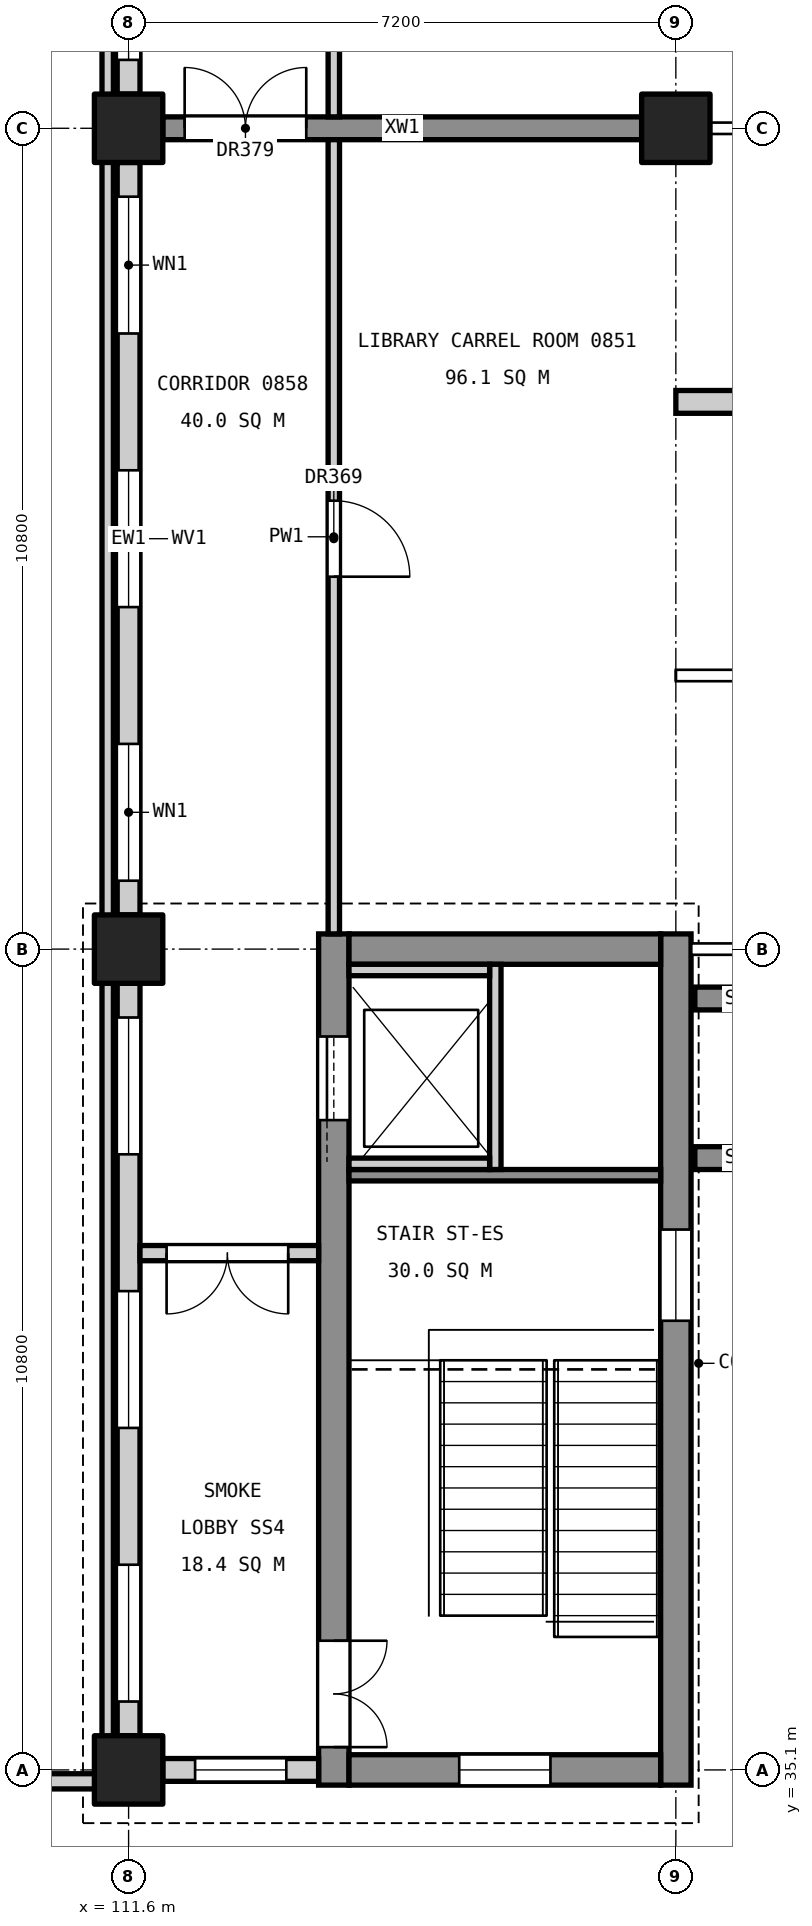
"""IFC4 building model, lengths in metres.
Left out: names, types, materials, properties, quantities, classifications, styles, units other than length and angle.
Written with IfcOpenShell. Run it as: python <this file> out.ifc"""

import sys

from ifc_helpers import new_model, si_unit, direction, frame, frame_2d, origin, origin_2d, place, context, subcontext, project, spatial, rectangle, extrude, element, fill, save


model = new_model("IFC4")
c1 = context("Model", 3, precision=1e-05, world=origin(), true_north=direction((0.0, 1.0)))
c2 = subcontext(c1, "Body", "Model", "MODEL_VIEW")
j1 = project(units=[si_unit("LENGTHUNIT", "METRE"), si_unit("PLANEANGLEUNIT", "RADIAN")], contexts=[c1])
p1 = place(None, origin())
s1 = spatial("IfcSite", under=j1, at=p1, CompositionType="ELEMENT")
p2 = place(p1, origin())
s2 = spatial("IfcBuilding", under=s1, at=p2, CompositionType="ELEMENT")
p3 = place(p2, frame((0.0, 0.0, 41.4)))
s3 = spatial("IfcBuildingStorey", under=s2, at=p3, CompositionType="ELEMENT", Elevation=41.4)
for number, where, z_axis, x_axis in (
    (1, (118.8, 56.7, 0.0), (0.0, 0.0, 1.0), (1.0, 0.0, 0.0)),
    (2, (111.6, 35.1, 0.0), (0.0, 0.0, 1.0), (1.0, 0.0, 0.0)),
    (3, (111.6, 45.9, 0.0), (0.0, 0.0, 1.0), (1.0, 0.0, 0.0)),
    (4, (111.6, 56.7, 0.0), (0.0, 0.0, 1.0), (1.0, 0.0, 0.0)),
):
    element("IfcColumn", number, at=place(p3, frame(where, z_axis=z_axis, x_axis=x_axis)), inside=s3, PredefinedType="COLUMN", context=c2, shape_type="SweptSolid", body=[
        extrude(rectangle(XDim=0.9, YDim=0.9, at=origin_2d()), origin(), (0.0, 0.0, 1.0), 4.8),
    ])
p4 = place(p3, frame((118.8, 34.9, 0.0), z_axis=(0.0, 0.0, 1.0), x_axis=(0.0, 1.0, 0.0)))
e5 = element("IfcWall", 5, at=p4, inside=s3, PredefinedType="SHEAR", context=c2, shape_type="SweptSolid", body=[
    extrude(rectangle(XDim=11.2, YDim=0.4, at=frame_2d((5.6, 0.0))), origin(), (0.0, 0.0, 1.0), 4.55),
])
p5 = place(p4, frame((6.11, 0.0, 3.4)))
e6 = element("IfcOpeningElement", 6, at=p5, cuts=e5, PredefinedType="OPENING", context=c2, shape_type="SweptSolid", body=[
    extrude(rectangle(XDim=1.2, YDim=0.9, at=frame_2d((0.6, 0.45))), frame((0.0, 0.21, 0.0), z_axis=(0.0, -1.0, 0.0), x_axis=(1.0, 0.0, 0.0)), (0.0, 0.0, 1.0), 0.42),
])
p6 = place(p3, frame((114.3, 34.9, 0.0), z_axis=(0.0, 0.0, 1.0), x_axis=(0.0, 1.0, 0.0)))
e7 = element("IfcWall", 7, at=p6, inside=s3, PredefinedType="SHEAR", context=c2, shape_type="SweptSolid", body=[
    extrude(rectangle(XDim=11.2, YDim=0.4, at=frame_2d((5.6, 0.0))), origin(), (0.0, 0.0, 1.0), 4.55),
])
p7 = place(p6, frame((0.5, 0.0, 0.0)))
e8 = element("IfcOpeningElement", 8, at=p7, cuts=e7, PredefinedType="OPENING", context=c2, shape_type="SweptSolid", body=[
    extrude(rectangle(XDim=1.4, YDim=2.1, at=frame_2d((0.7, 1.05))), frame((0.0, 0.21, 0.0), z_axis=(0.0, -1.0, 0.0), x_axis=(1.0, 0.0, 0.0)), (0.0, 0.0, 1.0), 0.42),
])
p8 = place(p6, frame((8.75, 0.0, 0.0)))
e9 = element("IfcOpeningElement", 9, at=p8, cuts=e7, PredefinedType="OPENING", context=c2, shape_type="SweptSolid", body=[
    extrude(rectangle(XDim=1.1, YDim=2.1, at=frame_2d((0.55, 1.05))), frame((0.0, 0.21, 0.0), z_axis=(0.0, -1.0, 0.0), x_axis=(1.0, 0.0, 0.0)), (0.0, 0.0, 1.0), 0.42),
])
p9 = place(p3, frame((118.6, 35.1, 0.0), z_axis=(0.0, 0.0, 1.0), x_axis=(-1.0, 0.0, 0.0)))
e10 = element("IfcWall", 10, at=p9, inside=s3, PredefinedType="SHEAR", context=c2, shape_type="SweptSolid", body=[
    extrude(rectangle(XDim=4.1, YDim=0.4, at=frame_2d((2.05, 0.0))), origin(), (0.0, 0.0, 1.0), 4.55),
])
p10 = place(p9, frame((1.45, 0.0, 3.4)))
e11 = element("IfcOpeningElement", 11, at=p10, cuts=e10, PredefinedType="OPENING", context=c2, shape_type="SweptSolid", body=[
    extrude(rectangle(XDim=1.2, YDim=0.9, at=frame_2d((0.6, 0.45))), frame((0.0, 0.21, 0.0), z_axis=(0.0, -1.0, 0.0), x_axis=(1.0, 0.0, 0.0)), (0.0, 0.0, 1.0), 0.42),
])
p11 = place(p3, frame((118.6, 45.9, 0.0), z_axis=(0.0, 0.0, 1.0), x_axis=(-1.0, 0.0, 0.0)))
e12 = element("IfcWall", 12, at=p11, inside=s3, PredefinedType="SHEAR", context=c2, shape_type="SweptSolid", body=[
    extrude(rectangle(XDim=4.1, YDim=0.4, at=frame_2d((2.05, 0.0))), origin(), (0.0, 0.0, 1.0), 4.55),
])
for number, where, z_axis, x_axis in (
    (13, (119.05, 43.15, 0.0), (0.0, 0.0, 1.0), (1.0, 0.0, 0.0)),
    (14, (119.05, 45.25, 0.0), (0.0, 0.0, 1.0), (1.0, 0.0, 0.0)),
):
    element("IfcWall", number, at=place(p3, frame(where, z_axis=z_axis, x_axis=x_axis)), inside=s3, PredefinedType="SHEAR", context=c2, shape_type="SweptSolid", body=[
        extrude(rectangle(XDim=1.25, YDim=0.3, at=frame_2d((0.625, 0.0))), origin(), (0.0, 0.0, 1.0), 4.8),
    ])
p12 = place(p3, frame((118.35, 56.7, 0.0), z_axis=(0.0, 0.0, 1.0), x_axis=(-1.0, 0.0, 0.0)))
e15 = element("IfcWall", 15, at=p12, inside=s3, PredefinedType="SHEAR", context=c2, shape_type="SweptSolid", body=[
    extrude(rectangle(XDim=6.3, YDim=0.3, at=frame_2d((3.15, 0.0))), origin(), (0.0, 0.0, 1.0), 4.55),
])
p13 = place(p12, frame((4.413, 0.0, 0.0)))
e16 = element("IfcOpeningElement", 16, at=p13, cuts=e15, PredefinedType="OPENING", context=c2, shape_type="SweptSolid", body=[
    extrude(rectangle(XDim=1.6, YDim=2.1, at=frame_2d((0.8, 1.05))), frame((0.0, 0.16, 0.0), z_axis=(0.0, -1.0, 0.0), x_axis=(1.0, 0.0, 0.0)), (0.0, 0.0, 1.0), 0.32),
])
p14 = place(p3, frame((118.6, 42.925, 0.0), z_axis=(0.0, 0.0, 1.0), x_axis=(-1.0, 0.0, 0.0)))
e17 = element("IfcWall", 17, at=p14, inside=s3, PredefinedType="SOLIDWALL", context=c2, shape_type="SweptSolid", body=[
    extrude(rectangle(XDim=4.1, YDim=0.15, at=frame_2d((2.05, 0.0))), origin(), (0.0, 0.0, 1.0), 4.55),
])
p15 = place(p3, frame((116.425, 43.0, 0.0), z_axis=(0.0, 0.0, 1.0), x_axis=(0.0, 1.0, 0.0)))
e18 = element("IfcWall", 18, at=p15, inside=s3, PredefinedType="SOLIDWALL", context=c2, shape_type="SweptSolid", body=[
    extrude(rectangle(XDim=2.7, YDim=0.15, at=frame_2d((1.35, 0.0))), origin(), (0.0, 0.0, 1.0), 4.55),
])
for number, where, z_axis, x_axis in (
    (19, (116.35, 43.075, 0.0), (0.0, 0.0, 1.0), (-1.0, 0.0, 0.0)),
    (20, (116.35, 45.625, 0.0), (0.0, 0.0, 1.0), (-1.0, 0.0, 0.0)),
):
    element("IfcWall", number, at=place(p3, frame(where, z_axis=z_axis, x_axis=x_axis)), inside=s3, PredefinedType="SOLIDWALL", context=c2, shape_type="SweptSolid", body=[
        extrude(rectangle(XDim=1.85, YDim=0.15, at=frame_2d((0.925, 0.0))), origin(), (0.0, 0.0, 1.0), 4.55),
    ])
p16 = place(p3, frame((111.25, 34.95, 0.0), z_axis=(0.0, 0.0, 1.0), x_axis=(-1.0, 0.0, 0.0)))
e21 = element("IfcWall", 21, at=p16, inside=s3, PredefinedType="PARAPET", context=c2, shape_type="SweptSolid", body=[
    extrude(rectangle(XDim=10.8, YDim=0.2, at=frame_2d((5.4, 0.0))), origin(), (0.0, 0.0, 1.0), 1.1),
])
p17 = place(p3, frame((111.325, 35.05, 0.0), z_axis=(0.0, 0.0, 1.0), x_axis=(0.0, 1.0, 0.0)))
e22 = element("IfcWall", 22, at=p17, inside=s3, PredefinedType="PARAPET", context=c2, shape_type="SweptSolid", body=[
    extrude(rectangle(XDim=64.9, YDim=0.15, at=frame_2d((32.45, 0.0))), origin(), (0.0, 0.0, 1.0), 0.3),
])
p18 = place(p3, frame((114.1, 35.1, 0.0), z_axis=(0.0, 0.0, 1.0), x_axis=(-1.0, 0.0, 0.0)))
e23 = element("IfcWall", 23, at=p18, inside=s3, PredefinedType="STANDARD", context=c2, shape_type="SweptSolid", body=[
    extrude(rectangle(XDim=2.05, YDim=0.3, at=frame_2d((1.025, 0.0))), origin(), (0.0, 0.0, 1.0), 3.85),
])
p19 = place(p18, frame((0.425, 0.0, 0.9)))
e24 = element("IfcOpeningElement", 24, at=p19, cuts=e23, PredefinedType="OPENING", context=c2, shape_type="SweptSolid", body=[
    extrude(rectangle(XDim=1.2, YDim=2.4, at=frame_2d((0.6, 1.2))), frame((0.0, 0.16, 0.0), z_axis=(0.0, -1.0, 0.0), x_axis=(1.0, 0.0, 0.0)), (0.0, 0.0, 1.0), 0.32),
])
p20 = place(p3, frame((111.6, 35.55, 0.0), z_axis=(0.0, 0.0, 1.0), x_axis=(0.0, 1.0, 0.0)))
e25 = element("IfcWall", 25, at=p20, inside=s3, PredefinedType="STANDARD", context=c2, shape_type="SweptSolid", body=[
    extrude(rectangle(XDim=9.9, YDim=0.3, at=frame_2d((4.95, 0.0))), origin(), (0.0, 0.0, 1.0), 3.55),
])
p21 = place(p20, frame((0.45, 0.0, 0.9)))
e26 = element("IfcOpeningElement", 26, at=p21, cuts=e25, PredefinedType="OPENING", context=c2, shape_type="SweptSolid", body=[
    extrude(rectangle(XDim=1.8, YDim=2.4, at=frame_2d((0.9, 1.2))), frame((0.0, 0.16, 0.0), z_axis=(0.0, -1.0, 0.0), x_axis=(1.0, 0.0, 0.0)), (0.0, 0.0, 1.0), 0.32),
])
p22 = place(p20, frame((4.05, 0.0, 0.9)))
e27 = element("IfcOpeningElement", 27, at=p22, cuts=e25, PredefinedType="OPENING", context=c2, shape_type="SweptSolid", body=[
    extrude(rectangle(XDim=1.8, YDim=2.4, at=frame_2d((0.9, 1.2))), frame((0.0, 0.16, 0.0), z_axis=(0.0, -1.0, 0.0), x_axis=(1.0, 0.0, 0.0)), (0.0, 0.0, 1.0), 0.32),
])
p23 = place(p20, frame((7.65, 0.0, 0.9)))
e28 = element("IfcOpeningElement", 28, at=p23, cuts=e25, PredefinedType="OPENING", context=c2, shape_type="SweptSolid", body=[
    extrude(rectangle(XDim=1.8, YDim=2.4, at=frame_2d((0.9, 1.2))), frame((0.0, 0.16, 0.0), z_axis=(0.0, -1.0, 0.0), x_axis=(1.0, 0.0, 0.0)), (0.0, 0.0, 1.0), 0.32),
])
p24 = place(p3, frame((111.6, 46.35, 0.0), z_axis=(0.0, 0.0, 1.0), x_axis=(0.0, 1.0, 0.0)))
e29 = element("IfcWall", 29, at=p24, inside=s3, PredefinedType="STANDARD", context=c2, shape_type="SweptSolid", body=[
    extrude(rectangle(XDim=9.9, YDim=0.3, at=frame_2d((4.95, 0.0))), origin(), (0.0, 0.0, 1.0), 3.55),
])
p25 = place(p24, frame((0.45, 0.0, 0.9)))
e30 = element("IfcOpeningElement", 30, at=p25, cuts=e29, PredefinedType="OPENING", context=c2, shape_type="SweptSolid", body=[
    extrude(rectangle(XDim=1.8, YDim=2.4, at=frame_2d((0.9, 1.2))), frame((0.0, 0.16, 0.0), z_axis=(0.0, -1.0, 0.0), x_axis=(1.0, 0.0, 0.0)), (0.0, 0.0, 1.0), 0.32),
])
p26 = place(p24, frame((4.05, 0.0, 0.9)))
e31 = element("IfcOpeningElement", 31, at=p26, cuts=e29, PredefinedType="OPENING", context=c2, shape_type="SweptSolid", body=[
    extrude(rectangle(XDim=1.8, YDim=2.4, at=frame_2d((0.9, 1.2))), frame((0.0, 0.16, 0.0), z_axis=(0.0, -1.0, 0.0), x_axis=(1.0, 0.0, 0.0)), (0.0, 0.0, 1.0), 0.32),
])
p27 = place(p24, frame((7.65, 0.0, 0.9)))
e32 = element("IfcOpeningElement", 32, at=p27, cuts=e29, PredefinedType="OPENING", context=c2, shape_type="SweptSolid", body=[
    extrude(rectangle(XDim=1.8, YDim=2.4, at=frame_2d((0.9, 1.2))), frame((0.0, 0.16, 0.0), z_axis=(0.0, -1.0, 0.0), x_axis=(1.0, 0.0, 0.0)), (0.0, 0.0, 1.0), 0.32),
])
p28 = place(p3, frame((111.6, 57.15, 0.0), z_axis=(0.0, 0.0, 1.0), x_axis=(0.0, 1.0, 0.0)))
e33 = element("IfcWall", 33, at=p28, inside=s3, PredefinedType="STANDARD", context=c2, shape_type="SweptSolid", body=[
    extrude(rectangle(XDim=9.9, YDim=0.3, at=frame_2d((4.95, 0.0))), origin(), (0.0, 0.0, 1.0), 3.55),
])
p29 = place(p28, frame((0.45, 0.0, 0.9)))
e34 = element("IfcOpeningElement", 34, at=p29, cuts=e33, PredefinedType="OPENING", context=c2, shape_type="SweptSolid", body=[
    extrude(rectangle(XDim=1.8, YDim=2.4, at=frame_2d((0.9, 1.2))), frame((0.0, 0.16, 0.0), z_axis=(0.0, -1.0, 0.0), x_axis=(1.0, 0.0, 0.0)), (0.0, 0.0, 1.0), 0.32),
])
p30 = place(p28, frame((4.05, 0.0, 0.9)))
e35 = element("IfcOpeningElement", 35, at=p30, cuts=e33, PredefinedType="OPENING", context=c2, shape_type="SweptSolid", body=[
    extrude(rectangle(XDim=1.8, YDim=2.4, at=frame_2d((0.9, 1.2))), frame((0.0, 0.16, 0.0), z_axis=(0.0, -1.0, 0.0), x_axis=(1.0, 0.0, 0.0)), (0.0, 0.0, 1.0), 0.32),
])
p31 = place(p28, frame((7.65, 0.0, 0.9)))
e36 = element("IfcOpeningElement", 36, at=p31, cuts=e33, PredefinedType="OPENING", context=c2, shape_type="SweptSolid", body=[
    extrude(rectangle(XDim=1.8, YDim=2.4, at=frame_2d((0.9, 1.2))), frame((0.0, 0.16, 0.0), z_axis=(0.0, -1.0, 0.0), x_axis=(1.0, 0.0, 0.0)), (0.0, 0.0, 1.0), 0.32),
])
p32 = place(p3, frame((123.6, 53.1, 0.0), z_axis=(0.0, 0.0, 1.0), x_axis=(-1.0, 0.0, 0.0)))
e37 = element("IfcWall", 37, at=p32, inside=s3, PredefinedType="STANDARD", context=c2, shape_type="SweptSolid", body=[
    extrude(rectangle(XDim=4.8, YDim=0.3, at=frame_2d((2.4, 0.0))), origin(), (0.0, 0.0, 1.0), 3.65),
])
p33 = place(p3, frame((114.3, 46.1, 0.0), z_axis=(0.0, 0.0, 1.0), x_axis=(0.0, 1.0, 0.0)))
e38 = element("IfcWall", 38, at=p33, inside=s3, PredefinedType="PARTITIONING", context=c2, shape_type="SweptSolid", body=[
    extrude(rectangle(XDim=10.45, YDim=0.15, at=frame_2d((5.225, 0.0))), origin(), (0.0, 0.0, 1.0), 3.55),
])
p34 = place(p33, frame((4.7, 0.0, 0.0)))
e39 = element("IfcOpeningElement", 39, at=p34, cuts=e38, PredefinedType="OPENING", context=c2, shape_type="SweptSolid", body=[
    extrude(rectangle(XDim=1.0, YDim=2.1, at=frame_2d((0.5, 1.05))), frame((0.0, 0.085, 0.0), z_axis=(0.0, -1.0, 0.0), x_axis=(1.0, 0.0, 0.0)), (0.0, 0.0, 1.0), 0.17),
])
p35 = place(p3, frame((114.3, 56.85, 0.0), z_axis=(0.0, 0.0, 1.0), x_axis=(0.0, 1.0, 0.0)))
e40 = element("IfcWall", 40, at=p35, inside=s3, PredefinedType="PARTITIONING", context=c2, shape_type="SweptSolid", body=[
    extrude(rectangle(XDim=3.25, YDim=0.15, at=frame_2d((1.625, 0.0))), origin(), (0.0, 0.0, 1.0), 3.55),
])
p36 = place(p35, frame((1.15, 0.0, 0.0)))
e41 = element("IfcOpeningElement", 41, at=p36, cuts=e40, PredefinedType="OPENING", context=c2, shape_type="SweptSolid", body=[
    extrude(rectangle(XDim=1.0, YDim=2.1, at=frame_2d((0.5, 1.05))), frame((0.0, 0.085, 0.0), z_axis=(0.0, -1.0, 0.0), x_axis=(1.0, 0.0, 0.0)), (0.0, 0.0, 1.0), 0.17),
])
p37 = place(p3, frame((114.1, 41.9, 0.0), z_axis=(0.0, 0.0, 1.0), x_axis=(-1.0, 0.0, 0.0)))
e42 = element("IfcWall", 42, at=p37, inside=s3, PredefinedType="PARTITIONING", context=c2, shape_type="SweptSolid", body=[
    extrude(rectangle(XDim=2.35, YDim=0.2, at=frame_2d((1.175, 0.0))), origin(), (0.0, 0.0, 1.0), 3.55),
])
p38 = place(p37, frame((0.4, 0.0, 0.0)))
e43 = element("IfcOpeningElement", 43, at=p38, cuts=e42, PredefinedType="OPENING", context=c2, shape_type="SweptSolid", body=[
    extrude(rectangle(XDim=1.6, YDim=2.1, at=frame_2d((0.8, 1.05))), frame((0.0, 0.11, 0.0), z_axis=(0.0, -1.0, 0.0), x_axis=(1.0, 0.0, 0.0)), (0.0, 0.0, 1.0), 0.22),
])
p39 = place(p7, frame((1.4, 0.0, 0.0), z_axis=(0.0, 0.0, 1.0), x_axis=(-1.0, 0.0, 0.0)))
e44 = element("IfcDoor", 44, at=p39, inside=s3, OperationType="DOUBLE_DOOR_SINGLE_SWING", PredefinedType="DOOR", context=c2, shape_type="SweptSolid", body=[
    extrude(rectangle(XDim=1.4, YDim=2.1, at=frame_2d((0.7, 1.05))), frame((0.0, 0.025, 0.0), z_axis=(0.0, -1.0, 0.0), x_axis=(1.0, 0.0, 0.0)), (0.0, 0.0, 1.0), 0.05),
])
fill(e8, e44)
p40 = place(p8, origin())
e45 = element("IfcDoor", 45, at=p40, inside=s3, OperationType="SLIDING_TO_LEFT", PredefinedType="DOOR", context=c2, shape_type="SweptSolid", body=[
    extrude(rectangle(XDim=1.1, YDim=2.1, at=frame_2d((0.55, 1.05))), frame((0.0, 0.025, 0.0), z_axis=(0.0, -1.0, 0.0), x_axis=(1.0, 0.0, 0.0)), (0.0, 0.0, 1.0), 0.05),
])
fill(e9, e45)
p41 = place(p19, origin())
e46 = element("IfcWindow", 46, at=p41, inside=s3, PartitioningType="SINGLE_PANEL", PredefinedType="WINDOW", context=c2, shape_type="SweptSolid", body=[
    extrude(rectangle(XDim=1.2, YDim=2.4, at=frame_2d((0.6, 1.2))), frame((0.0, 0.03, 0.0), z_axis=(0.0, -1.0, 0.0), x_axis=(1.0, 0.0, 0.0)), (0.0, 0.0, 1.0), 0.06),
])
fill(e24, e46)
p42 = place(p21, origin())
e47 = element("IfcWindow", 47, at=p42, inside=s3, PartitioningType="SINGLE_PANEL", PredefinedType="WINDOW", context=c2, shape_type="SweptSolid", body=[
    extrude(rectangle(XDim=1.8, YDim=2.4, at=frame_2d((0.9, 1.2))), frame((0.0, 0.03, 0.0), z_axis=(0.0, -1.0, 0.0), x_axis=(1.0, 0.0, 0.0)), (0.0, 0.0, 1.0), 0.06),
])
fill(e26, e47)
p43 = place(p22, origin())
e48 = element("IfcWindow", 48, at=p43, inside=s3, PartitioningType="SINGLE_PANEL", PredefinedType="WINDOW", context=c2, shape_type="SweptSolid", body=[
    extrude(rectangle(XDim=1.8, YDim=2.4, at=frame_2d((0.9, 1.2))), frame((0.0, 0.03, 0.0), z_axis=(0.0, -1.0, 0.0), x_axis=(1.0, 0.0, 0.0)), (0.0, 0.0, 1.0), 0.06),
])
fill(e27, e48)
p44 = place(p23, origin())
e49 = element("IfcWindow", 49, at=p44, inside=s3, PartitioningType="SINGLE_PANEL", PredefinedType="WINDOW", context=c2, shape_type="SweptSolid", body=[
    extrude(rectangle(XDim=1.8, YDim=2.4, at=frame_2d((0.9, 1.2))), frame((0.0, 0.03, 0.0), z_axis=(0.0, -1.0, 0.0), x_axis=(1.0, 0.0, 0.0)), (0.0, 0.0, 1.0), 0.06),
])
fill(e28, e49)
p45 = place(p25, origin())
e50 = element("IfcWindow", 50, at=p45, inside=s3, PartitioningType="SINGLE_PANEL", PredefinedType="WINDOW", context=c2, shape_type="SweptSolid", body=[
    extrude(rectangle(XDim=1.8, YDim=2.4, at=frame_2d((0.9, 1.2))), frame((0.0, 0.03, 0.0), z_axis=(0.0, -1.0, 0.0), x_axis=(1.0, 0.0, 0.0)), (0.0, 0.0, 1.0), 0.06),
])
fill(e30, e50)
p46 = place(p26, origin())
e51 = element("IfcWindow", 51, at=p46, inside=s3, PartitioningType="SINGLE_PANEL", PredefinedType="WINDOW", context=c2, shape_type="SweptSolid", body=[
    extrude(rectangle(XDim=1.8, YDim=2.4, at=frame_2d((0.9, 1.2))), frame((0.0, 0.03, 0.0), z_axis=(0.0, -1.0, 0.0), x_axis=(1.0, 0.0, 0.0)), (0.0, 0.0, 1.0), 0.06),
])
fill(e31, e51)
p47 = place(p27, origin())
e52 = element("IfcWindow", 52, at=p47, inside=s3, PartitioningType="SINGLE_PANEL", PredefinedType="WINDOW", context=c2, shape_type="SweptSolid", body=[
    extrude(rectangle(XDim=1.8, YDim=2.4, at=frame_2d((0.9, 1.2))), frame((0.0, 0.03, 0.0), z_axis=(0.0, -1.0, 0.0), x_axis=(1.0, 0.0, 0.0)), (0.0, 0.0, 1.0), 0.06),
])
fill(e32, e52)
p48 = place(p29, origin())
e53 = element("IfcWindow", 53, at=p48, inside=s3, PartitioningType="SINGLE_PANEL", PredefinedType="WINDOW", context=c2, shape_type="SweptSolid", body=[
    extrude(rectangle(XDim=1.8, YDim=2.4, at=frame_2d((0.9, 1.2))), frame((0.0, 0.03, 0.0), z_axis=(0.0, -1.0, 0.0), x_axis=(1.0, 0.0, 0.0)), (0.0, 0.0, 1.0), 0.06),
])
fill(e34, e53)
p49 = place(p5, origin())
e54 = element("IfcWindow", 54, at=p49, inside=s3, PartitioningType="SINGLE_PANEL", PredefinedType="WINDOW", context=c2, shape_type="SweptSolid", body=[
    extrude(rectangle(XDim=1.2, YDim=0.9, at=frame_2d((0.6, 0.45))), frame((0.0, 0.03, 0.0), z_axis=(0.0, -1.0, 0.0), x_axis=(1.0, 0.0, 0.0)), (0.0, 0.0, 1.0), 0.06),
])
fill(e6, e54)
p50 = place(p10, origin())
e55 = element("IfcWindow", 55, at=p50, inside=s3, PartitioningType="SINGLE_PANEL", PredefinedType="WINDOW", context=c2, shape_type="SweptSolid", body=[
    extrude(rectangle(XDim=1.2, YDim=0.9, at=frame_2d((0.6, 0.45))), frame((0.0, 0.03, 0.0), z_axis=(0.0, -1.0, 0.0), x_axis=(1.0, 0.0, 0.0)), (0.0, 0.0, 1.0), 0.06),
])
fill(e11, e55)
p51 = place(p34, frame((1.0, 0.0, 0.0), z_axis=(0.0, 0.0, 1.0), x_axis=(-1.0, 0.0, 0.0)))
e56 = element("IfcDoor", 56, at=p51, inside=s3, OperationType="SINGLE_SWING_RIGHT", PredefinedType="DOOR", context=c2, shape_type="SweptSolid", body=[
    extrude(rectangle(XDim=1.0, YDim=2.1, at=frame_2d((0.5, 1.05))), frame((0.0, 0.025, 0.0), z_axis=(0.0, -1.0, 0.0), x_axis=(1.0, 0.0, 0.0)), (0.0, 0.0, 1.0), 0.05),
])
fill(e39, e56)
p52 = place(p38, origin())
e57 = element("IfcDoor", 57, at=p52, inside=s3, OperationType="DOUBLE_DOOR_SINGLE_SWING", PredefinedType="DOOR", context=c2, shape_type="SweptSolid", body=[
    extrude(rectangle(XDim=1.6, YDim=2.1, at=frame_2d((0.8, 1.05))), frame((0.0, 0.025, 0.0), z_axis=(0.0, -1.0, 0.0), x_axis=(1.0, 0.0, 0.0)), (0.0, 0.0, 1.0), 0.05),
])
fill(e43, e57)
p53 = place(p13, frame((1.6, 0.0, 0.0), z_axis=(0.0, 0.0, 1.0), x_axis=(-1.0, 0.0, 0.0)))
e58 = element("IfcDoor", 58, at=p53, inside=s3, OperationType="DOUBLE_DOOR_SINGLE_SWING", PredefinedType="DOOR", context=c2, shape_type="SweptSolid", body=[
    extrude(rectangle(XDim=1.6, YDim=2.1, at=frame_2d((0.8, 1.05))), frame((0.0, 0.025, 0.0), z_axis=(0.0, -1.0, 0.0), x_axis=(1.0, 0.0, 0.0)), (0.0, 0.0, 1.0), 0.05),
])
fill(e16, e58)
save(model, sys.argv[1])
